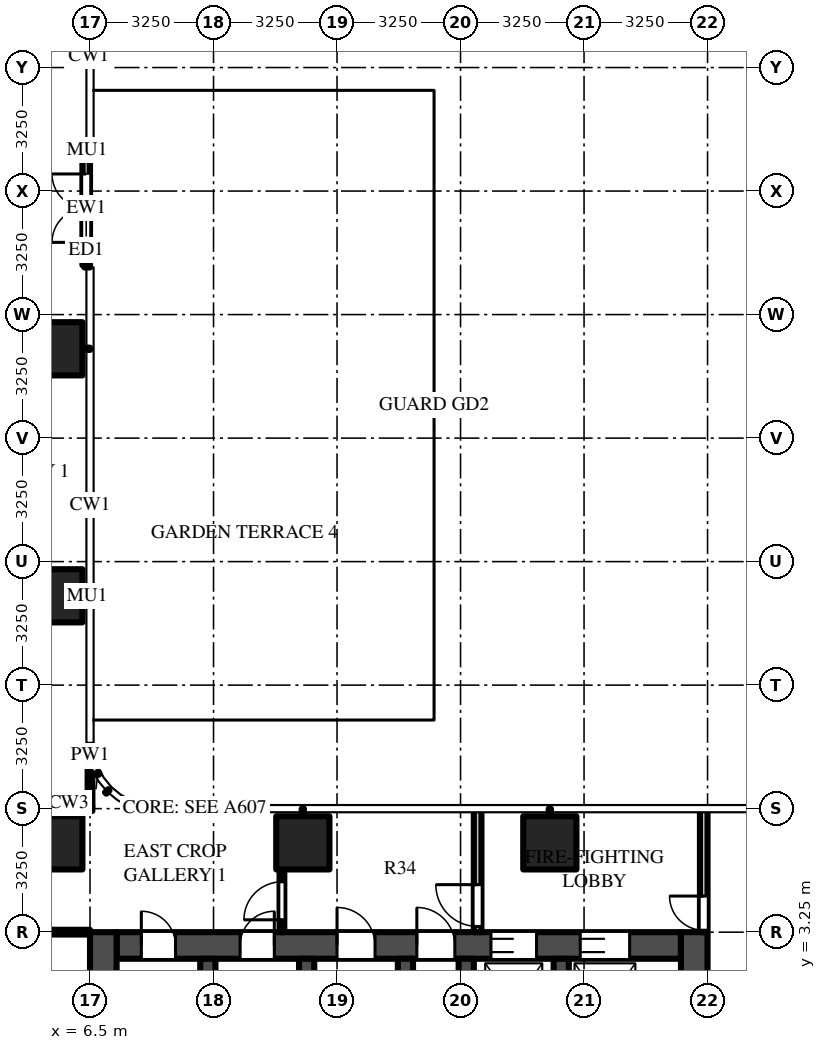
"""IFC4 building model, lengths in metres.
Left out: names, types, materials, properties, quantities, classifications, styles, units other than length and angle.
Written with IfcOpenShell. Run it as: python <this file> out.ifc"""

import sys

from ifc_helpers import new_model, si_unit, direction, frame, frame_2d, origin, origin_2d, place, context, subcontext, project, spatial, rectangle, extrude, source, transform, mapped, element, fill, save


model = new_model("IFC4")
c1 = context("Model", 3, precision=1e-05, world=origin(), true_north=direction((0.0, 1.0)))
c2 = subcontext(c1, "Body", "Model", "MODEL_VIEW")
j1 = project(units=[si_unit("LENGTHUNIT", "METRE"), si_unit("PLANEANGLEUNIT", "RADIAN")], contexts=[c1])
p1 = place(None, origin())
s1 = spatial("IfcSite", under=j1, at=p1, CompositionType="ELEMENT")
p2 = place(p1, origin())
s2 = spatial("IfcBuilding", under=s1, at=p2, CompositionType="ELEMENT")
p3 = place(p2, frame((0.0, 0.0, 34.0)))
s3 = spatial("IfcBuildingStorey", under=s2, at=p3, CompositionType="ELEMENT", Elevation=34.0)
m1 = source(origin(), c2, "Body", "SweptSolid", [
    extrude(rectangle(XDim=1.4, YDim=1.4, at=origin_2d()), origin(), (0.0, 0.0, 1.0), 4.5),
])
for number, where, z_axis, x_axis in (
    (1, (12.1, 5.6, 0.0), (0.0, 0.0, 1.0), (1.0, 0.0, 0.0)),
    (2, (18.6, 5.6, 0.0), (0.0, 0.0, 1.0), (1.0, 0.0, 0.0)),
    (3, (5.6, 12.1, 0.0), (0.0, 0.0, 1.0), (1.0, 0.0, 0.0)),
    (4, (5.6, 18.6, 0.0), (0.0, 0.0, 1.0), (1.0, 0.0, 0.0)),
    (5, (5.6, 5.6, 0.0), (0.0, 0.0, 1.0), (1.0, 0.0, 0.0)),
):
    element("IfcColumn", number, at=place(p3, frame(where, z_axis=z_axis, x_axis=x_axis)), inside=s3, PredefinedType="COLUMN", context=c2, shape_type="MappedRepresentation", body=[
        mapped(m1, transform((0.0, 0.0, 0.0))),
    ])
m2 = source(origin(), c2, "Body", "SweptSolid", [
    extrude(rectangle(XDim=14.85, YDim=0.7, at=frame_2d((7.425, 0.0))), origin(), (0.0, 0.0, 1.0), 4.25),
])
p4 = place(p3, frame((7.2, 2.9, 0.0), z_axis=(0.0, 0.0, 1.0), x_axis=(1.0, 0.0, 0.0)))
e6 = element("IfcWall", 6, at=p4, inside=s3, PredefinedType="SHEAR", context=c2, shape_type="MappedRepresentation", body=[
    mapped(m2, transform((0.0, 0.0, 0.0))),
])
m3 = source(origin(), c2, "Body", "SweptSolid", [
    extrude(rectangle(XDim=1.3, YDim=2.1, at=frame_2d((0.65, 1.05))), frame((0.0, 0.36, 0.0), z_axis=(0.0, -1.0, 0.0), x_axis=(1.0, 0.0, 0.0)), (0.0, 0.0, 1.0), 0.72),
])
p5 = place(p4, frame((12.2, 0.0, 0.0)))
e7 = element("IfcOpeningElement", 7, at=p5, cuts=e6, PredefinedType="OPENING", context=c2, shape_type="MappedRepresentation", body=[
    mapped(m3, transform((0.0, 0.0, 0.0))),
])
m4 = source(origin(), c2, "Body", "SweptSolid", [
    extrude(rectangle(XDim=1.2, YDim=2.1, at=frame_2d((0.6, 1.05))), frame((0.0, 0.36, 0.0), z_axis=(0.0, -1.0, 0.0), x_axis=(1.0, 0.0, 0.0)), (0.0, 0.0, 1.0), 0.72),
])
p6 = place(p4, frame((9.85, 0.0, 0.0)))
e8 = element("IfcOpeningElement", 8, at=p6, cuts=e6, PredefinedType="OPENING", context=c2, shape_type="MappedRepresentation", body=[
    mapped(m4, transform((0.0, 0.0, 0.0))),
])
m5 = source(origin(), c2, "Body", "SweptSolid", [
    extrude(rectangle(XDim=1.0, YDim=2.1, at=frame_2d((0.5, 1.05))), frame((0.0, 0.36, 0.0), z_axis=(0.0, -1.0, 0.0), x_axis=(1.0, 0.0, 0.0)), (0.0, 0.0, 1.0), 0.72),
])
p7 = place(p4, frame((7.9, 0.0, 0.0)))
e9 = element("IfcOpeningElement", 9, at=p7, cuts=e6, PredefinedType="OPENING", context=c2, shape_type="MappedRepresentation", body=[
    mapped(m5, transform((0.0, 0.0, 0.0))),
])
m6 = source(origin(), c2, "Body", "SweptSolid", [
    extrude(rectangle(XDim=0.9, YDim=2.1, at=frame_2d((0.45, 1.05))), frame((0.0, 0.36, 0.0), z_axis=(0.0, -1.0, 0.0), x_axis=(1.0, 0.0, 0.0)), (0.0, 0.0, 1.0), 0.72),
])
p8 = place(p4, frame((0.65, 0.0, 0.0)))
e10 = element("IfcOpeningElement", 10, at=p8, cuts=e6, PredefinedType="OPENING", context=c2, shape_type="MappedRepresentation", body=[
    mapped(m6, transform((0.0, 0.0, 0.0))),
])
p9 = place(p4, frame((3.25, 0.0, 0.0)))
e11 = element("IfcOpeningElement", 11, at=p9, cuts=e6, PredefinedType="OPENING", context=c2, shape_type="MappedRepresentation", body=[
    mapped(m6, transform((0.0, 0.0, 0.0))),
])
p10 = place(p4, frame((5.8, 0.0, 0.0)))
e12 = element("IfcOpeningElement", 12, at=p10, cuts=e6, PredefinedType="OPENING", context=c2, shape_type="MappedRepresentation", body=[
    mapped(m5, transform((0.0, 0.0, 0.0))),
])
m7 = source(origin(), c2, "Body", "SweptSolid", [
    extrude(rectangle(XDim=9.05, YDim=0.7, at=frame_2d((4.525, 0.0))), origin(), (0.0, 0.0, 1.0), 4.25),
])
p11 = place(p3, frame((6.85, -5.8, 0.0), z_axis=(0.0, 0.0, 1.0), x_axis=(0.0, 1.0, 0.0)))
e13 = element("IfcWall", 13, at=p11, inside=s3, PredefinedType="SHEAR", context=c2, shape_type="MappedRepresentation", body=[
    mapped(m7, transform((0.0, 0.0, 0.0))),
])
m8 = source(origin(), c2, "Body", "SweptSolid", [
    extrude(rectangle(XDim=1.8, YDim=2.1, at=frame_2d((0.9, 1.05))), frame((0.0, 0.36, 0.0), z_axis=(0.0, -1.0, 0.0), x_axis=(1.0, 0.0, 0.0)), (0.0, 0.0, 1.0), 0.72),
])
p12 = place(p11, frame((3.15, 0.0, 0.0)))
e14 = element("IfcOpeningElement", 14, at=p12, cuts=e13, PredefinedType="OPENING", context=c2, shape_type="MappedRepresentation", body=[
    mapped(m8, transform((0.0, 0.0, 0.0))),
])
p13 = place(p3, frame((22.4, -5.8, 0.0), z_axis=(0.0, 0.0, 1.0), x_axis=(0.0, 1.0, 0.0)))
e15 = element("IfcWall", 15, at=p13, inside=s3, PredefinedType="SHEAR", context=c2, shape_type="MappedRepresentation", body=[
    mapped(m7, transform((0.0, 0.0, 0.0))),
])
m9 = source(origin(), c2, "Body", "SweptSolid", [
    extrude(rectangle(XDim=2.45, YDim=0.4, at=frame_2d((1.225, 0.0))), origin(), (0.0, 0.0, 1.0), 4.25),
])
for number, where, z_axis, x_axis in (
    (16, (9.6, 0.1, 0.0), (0.0, 0.0, 1.0), (0.0, 1.0, 0.0)),
    (17, (12.2, 0.1, 0.0), (0.0, 0.0, 1.0), (0.0, 1.0, 0.0)),
    (18, (14.8, 0.1, 0.0), (0.0, 0.0, 1.0), (0.0, 1.0, 0.0)),
    (19, (16.4, 0.1, 0.0), (0.0, 0.0, 1.0), (0.0, 1.0, 0.0)),
    (20, (18.9, 0.1, 0.0), (0.0, 0.0, 1.0), (0.0, 1.0, 0.0)),
):
    element("IfcWall", number, at=place(p3, frame(where, z_axis=z_axis, x_axis=x_axis)), inside=s3, PredefinedType="SHEAR", context=c2, shape_type="MappedRepresentation", body=[
        mapped(m9, transform((0.0, 0.0, 0.0))),
    ])
m10 = source(origin(), c2, "Body", "SweptSolid", [
    extrude(rectangle(XDim=3.25, YDim=0.2, at=frame_2d((1.625, 0.0))), origin(), (0.0, 0.0, 1.0), 4.25),
])
p14 = place(p3, frame((16.7, 3.25, 0.0), z_axis=(0.0, 0.0, 1.0), x_axis=(0.0, 1.0, 0.0)))
e21 = element("IfcWall", 21, at=p14, inside=s3, PredefinedType="PARTITIONING", context=c2, shape_type="MappedRepresentation", body=[
    mapped(m10, transform((0.0, 0.0, 0.0))),
])
m11 = source(origin(), c2, "Body", "SweptSolid", [
    extrude(rectangle(XDim=1.1, YDim=2.1, at=frame_2d((0.55, 1.05))), frame((0.0, 0.11, 0.0), z_axis=(0.0, -1.0, 0.0), x_axis=(1.0, 0.0, 0.0)), (0.0, 0.0, 1.0), 0.22),
])
p15 = place(p14, frame((0.15, 0.0, 0.0)))
e22 = element("IfcOpeningElement", 22, at=p15, cuts=e21, PredefinedType="OPENING", context=c2, shape_type="MappedRepresentation", body=[
    mapped(m11, transform((0.0, 0.0, 0.0))),
])
p16 = place(p3, frame((22.65, 3.25, 0.0), z_axis=(0.0, 0.0, 1.0), x_axis=(0.0, 1.0, 0.0)))
e23 = element("IfcWall", 23, at=p16, inside=s3, PredefinedType="PARTITIONING", context=c2, shape_type="MappedRepresentation", body=[
    mapped(m10, transform((0.0, 0.0, 0.0))),
])
m12 = source(origin(), c2, "Body", "SweptSolid", [
    extrude(rectangle(XDim=0.9, YDim=2.1, at=frame_2d((0.45, 1.05))), frame((0.0, 0.11, 0.0), z_axis=(0.0, -1.0, 0.0), x_axis=(1.0, 0.0, 0.0)), (0.0, 0.0, 1.0), 0.22),
])
p17 = place(p16, frame((0.05, 0.0, 0.0)))
e24 = element("IfcOpeningElement", 24, at=p17, cuts=e23, PredefinedType="OPENING", context=c2, shape_type="MappedRepresentation", body=[
    mapped(m12, transform((0.0, 0.0, 0.0))),
])
m13 = source(origin(), c2, "Body", "SweptSolid", [
    extrude(rectangle(XDim=3.0, YDim=0.2, at=frame_2d((1.5, 0.0))), origin(), (0.0, 0.0, 1.0), 4.25),
])
p18 = place(p3, frame((6.4, 20.8, 0.0), z_axis=(0.0, 0.0, 1.0), x_axis=(0.0, 1.0, 0.0)))
e25 = element("IfcWall", 25, at=p18, inside=s3, PredefinedType="SOLIDWALL", context=c2, shape_type="MappedRepresentation", body=[
    mapped(m13, transform((0.0, 0.0, 0.0))),
])
m14 = source(origin(), c2, "Body", "SweptSolid", [
    extrude(rectangle(XDim=1.8, YDim=2.4, at=frame_2d((0.9, 1.2))), frame((0.0, 0.11, 0.0), z_axis=(0.0, -1.0, 0.0), x_axis=(1.0, 0.0, 0.0)), (0.0, 0.0, 1.0), 0.22),
])
p19 = place(p18, frame((0.6, 0.0, 0.0)))
e26 = element("IfcOpeningElement", 26, at=p19, cuts=e25, PredefinedType="OPENING", context=c2, shape_type="MappedRepresentation", body=[
    mapped(m14, transform((0.0, 0.0, 0.0))),
])
m15 = source(origin(), c2, "Body", "SweptSolid", [
    extrude(rectangle(XDim=1.469, YDim=0.125, at=frame_2d((0.734, 0.0))), origin(), (0.0, 0.0, 1.0), 4.25),
])
p20 = place(p3, frame((6.5, 6.562, 0.0), z_axis=(0.0, 0.0, 1.0), x_axis=(0.0, 1.0, 0.0)))
e27 = element("IfcWall", 27, at=p20, inside=s3, PredefinedType="PARTITIONING", context=c2, shape_type="MappedRepresentation", body=[
    mapped(m15, transform((0.0, 0.0, 0.0))),
])
m16 = source(origin(), c2, "Body", "SweptSolid", [
    extrude(rectangle(XDim=1.65, YDim=0.125, at=frame_2d((0.825, 0.0))), origin(), (0.0, 0.0, 1.0), 4.25),
])
p21 = place(p3, frame((11.55, 3.25, 0.0), z_axis=(0.0, 0.0, 1.0), x_axis=(0.0, 1.0, 0.0)))
e28 = element("IfcWall", 28, at=p21, inside=s3, PredefinedType="PARTITIONING", context=c2, shape_type="MappedRepresentation", body=[
    mapped(m16, transform((0.0, 0.0, 0.0))),
])
m17 = source(origin(), c2, "Body", "SweptSolid", [
    extrude(rectangle(XDim=1.0, YDim=2.1, at=frame_2d((0.5, 1.05))), frame((0.0, 0.073, 0.0), z_axis=(0.0, -1.0, 0.0), x_axis=(1.0, 0.0, 0.0)), (0.0, 0.0, 1.0), 0.145),
])
p22 = place(p21, frame((0.325, 0.0, 0.0)))
e29 = element("IfcOpeningElement", 29, at=p22, cuts=e28, PredefinedType="OPENING", context=c2, shape_type="MappedRepresentation", body=[
    mapped(m17, transform((0.0, 0.0, 0.0))),
])
m18 = source(origin(), c2, "Body", "SweptSolid", [
    extrude(rectangle(XDim=5.363, YDim=0.125, at=frame_2d((2.681, 0.0))), origin(), (0.0, 0.0, 1.0), 3.468),
])
p23 = place(p3, frame((1.137, 3.25, 0.0), z_axis=(0.0, 0.0, 1.0), x_axis=(1.0, 0.0, 0.0)))
e30 = element("IfcWall", 30, at=p23, inside=s3, PredefinedType="PARTITIONING", context=c2, shape_type="MappedRepresentation", body=[
    mapped(m18, transform((0.0, 0.0, 0.0))),
])
m19 = source(origin(), c2, "Body", "SweptSolid", [
    extrude(rectangle(XDim=5.425, YDim=0.125, at=frame_2d((2.712, 0.0))), origin(), (0.0, 0.0, 1.0), 3.33),
])
p24 = place(p3, frame((1.137, 6.5, 0.0), z_axis=(0.0, 0.0, 1.0), x_axis=(1.0, 0.0, 0.0)))
e31 = element("IfcWall", 31, at=p24, inside=s3, PredefinedType="PARTITIONING", context=c2, shape_type="MappedRepresentation", body=[
    mapped(m19, transform((0.0, 0.0, 0.0))),
])
m20 = source(origin(), c2, "Body", "SweptSolid", [
    extrude(rectangle(XDim=1.3, YDim=2.1, at=frame_2d((0.65, 1.05))), frame((0.0, -0.275, 0.0), z_axis=(0.0, -1.0, 0.0), x_axis=(1.0, 0.0, 0.0)), (0.0, 0.0, 1.0), 0.05),
])
p25 = place(p5, origin())
e32 = element("IfcDoor", 32, at=p25, inside=s3, OperationType="DOUBLE_DOOR_SLIDING", PredefinedType="DOOR", context=c2, shape_type="MappedRepresentation", body=[
    mapped(m20, transform((0.0, 0.0, 0.0))),
])
fill(e7, e32)
m21 = source(origin(), c2, "Body", "SweptSolid", [
    extrude(rectangle(XDim=1.2, YDim=2.1, at=frame_2d((0.6, 1.05))), frame((0.0, -0.275, 0.0), z_axis=(0.0, -1.0, 0.0), x_axis=(1.0, 0.0, 0.0)), (0.0, 0.0, 1.0), 0.05),
])
p26 = place(p6, origin())
e33 = element("IfcDoor", 33, at=p26, inside=s3, OperationType="DOUBLE_DOOR_SLIDING", PredefinedType="DOOR", context=c2, shape_type="MappedRepresentation", body=[
    mapped(m21, transform((0.0, 0.0, 0.0))),
])
fill(e8, e33)
m22 = source(origin(), c2, "Body", "SweptSolid", [
    extrude(rectangle(XDim=1.0, YDim=2.1, at=frame_2d((0.5, 1.05))), frame((0.0, -0.275, 0.0), z_axis=(0.0, -1.0, 0.0), x_axis=(1.0, 0.0, 0.0)), (0.0, 0.0, 1.0), 0.05),
])
p27 = place(p7, origin())
e34 = element("IfcDoor", 34, at=p27, inside=s3, OperationType="SINGLE_SWING_LEFT", PredefinedType="DOOR", context=c2, shape_type="MappedRepresentation", body=[
    mapped(m22, transform((0.0, 0.0, 0.0))),
])
fill(e9, e34)
m23 = source(origin(), c2, "Body", "SweptSolid", [
    extrude(rectangle(XDim=1.1, YDim=2.1, at=frame_2d((0.55, 1.05))), frame((0.0, 0.025, 0.0), z_axis=(0.0, -1.0, 0.0), x_axis=(1.0, 0.0, 0.0)), (0.0, 0.0, 1.0), 0.05),
])
p28 = place(p15, origin())
e35 = element("IfcDoor", 35, at=p28, inside=s3, OperationType="SINGLE_SWING_RIGHT", PredefinedType="DOOR", context=c2, shape_type="MappedRepresentation", body=[
    mapped(m23, transform((0.0, 0.0, 0.0))),
])
fill(e22, e35)
m24 = source(origin(), c2, "Body", "SweptSolid", [
    extrude(rectangle(XDim=0.9, YDim=2.1, at=frame_2d((0.45, 1.05))), frame((0.0, 0.025, 0.0), z_axis=(0.0, -1.0, 0.0), x_axis=(1.0, 0.0, 0.0)), (0.0, 0.0, 1.0), 0.05),
])
p29 = place(p17, origin())
e36 = element("IfcDoor", 36, at=p29, inside=s3, OperationType="SINGLE_SWING_RIGHT", PredefinedType="DOOR", context=c2, shape_type="MappedRepresentation", body=[
    mapped(m24, transform((0.0, 0.0, 0.0))),
])
fill(e24, e36)
m25 = source(origin(), c2, "Body", "SweptSolid", [
    extrude(rectangle(XDim=0.9, YDim=2.1, at=frame_2d((0.45, 1.05))), frame((0.0, -0.275, 0.0), z_axis=(0.0, -1.0, 0.0), x_axis=(1.0, 0.0, 0.0)), (0.0, 0.0, 1.0), 0.05),
])
p30 = place(p8, origin())
e37 = element("IfcDoor", 37, at=p30, inside=s3, OperationType="SINGLE_SWING_LEFT", PredefinedType="DOOR", context=c2, shape_type="MappedRepresentation", body=[
    mapped(m25, transform((0.0, 0.0, 0.0))),
])
fill(e10, e37)
p31 = place(p9, origin())
e38 = element("IfcDoor", 38, at=p31, inside=s3, OperationType="SINGLE_SWING_RIGHT", PredefinedType="DOOR", context=c2, shape_type="MappedRepresentation", body=[
    mapped(m25, transform((0.0, 0.0, 0.0))),
])
fill(e11, e38)
p32 = place(p10, origin())
e39 = element("IfcDoor", 39, at=p32, inside=s3, OperationType="SINGLE_SWING_LEFT", PredefinedType="DOOR", context=c2, shape_type="MappedRepresentation", body=[
    mapped(m22, transform((0.0, 0.0, 0.0))),
])
fill(e12, e39)
m26 = source(origin(), c2, "Body", "SweptSolid", [
    extrude(rectangle(XDim=1.8, YDim=2.4, at=frame_2d((0.9, 1.2))), frame((0.0, 0.025, 0.0), z_axis=(0.0, -1.0, 0.0), x_axis=(1.0, 0.0, 0.0)), (0.0, 0.0, 1.0), 0.05),
])
p33 = place(p19, origin())
e40 = element("IfcDoor", 40, at=p33, inside=s3, OperationType="DOUBLE_DOOR_SINGLE_SWING", PredefinedType="DOOR", context=c2, shape_type="MappedRepresentation", body=[
    mapped(m26, transform((0.0, 0.0, 0.0))),
])
fill(e26, e40)
m27 = source(origin(), c2, "Body", "SweptSolid", [
    extrude(rectangle(XDim=1.0, YDim=2.1, at=frame_2d((0.5, 1.05))), frame((0.0, 0.025, 0.0), z_axis=(0.0, -1.0, 0.0), x_axis=(1.0, 0.0, 0.0)), (0.0, 0.0, 1.0), 0.05),
])
p34 = place(p22, origin())
e41 = element("IfcDoor", 41, at=p34, inside=s3, OperationType="SINGLE_SWING_LEFT", PredefinedType="DOOR", context=c2, shape_type="MappedRepresentation", body=[
    mapped(m27, transform((0.0, 0.0, 0.0))),
])
fill(e29, e41)
save(model, sys.argv[1])
